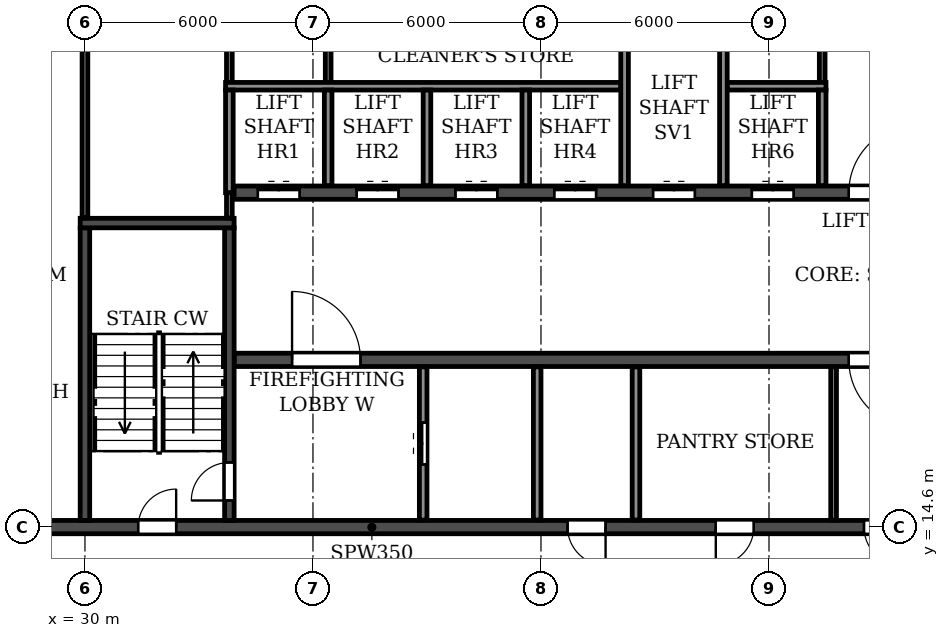
"""IFC4 building model, lengths in metres.
Left out: names, types, materials, properties, quantities, classifications, styles, units other than length and angle.
Written with IfcOpenShell. Run it as: python <this file> out.ifc"""

import sys

from ifc_helpers import new_model, si_unit, direction, frame, frame_2d, origin, place, context, subcontext, project, spatial, rectangle, extrude, element, fill, save


model = new_model("IFC4")
c1 = context("Model", 3, precision=1e-05, world=origin(), true_north=direction((0.0, 1.0)))
c2 = subcontext(c1, "Body", "Model", "MODEL_VIEW")
j1 = project(units=[si_unit("LENGTHUNIT", "METRE"), si_unit("PLANEANGLEUNIT", "RADIAN")], contexts=[c1])
p1 = place(None, origin())
s1 = spatial("IfcSite", under=j1, at=p1, CompositionType="ELEMENT")
p2 = place(p1, origin())
s2 = spatial("IfcBuilding", under=s1, at=p2, CompositionType="ELEMENT")
p3 = place(p2, frame((0.0, 0.0, 231.3)))
s3 = spatial("IfcBuildingStorey", under=s2, at=p3, CompositionType="ELEMENT", Elevation=231.3)
p4 = place(p3, frame((18.2, 14.6, 0.0), z_axis=(0.0, 0.0, 1.0), x_axis=(1.0, 0.0, 0.0)))
e1 = element("IfcWall", 1, at=p4, inside=s3, PredefinedType="SOLIDWALL", context=c2, shape_type="SweptSolid", body=[
    extrude(rectangle(XDim=65.6, YDim=0.35, at=frame_2d((32.8, 0.0))), origin(), (0.0, 0.0, 1.0), 3.08),
])
p5 = place(p4, frame((0.7, 0.0, 0.0)))
e2 = element("IfcOpeningElement", 2, at=p5, cuts=e1, PredefinedType="OPENING", context=c2, shape_type="SweptSolid", body=[
    extrude(rectangle(XDim=1.0, YDim=2.1, at=frame_2d((0.5, 1.05))), frame((0.0, 0.185, 0.0), z_axis=(0.0, -1.0, 0.0), x_axis=(1.0, 0.0, 0.0)), (0.0, 0.0, 1.0), 0.37),
])
p6 = place(p4, frame((8.6, 0.0, 0.0)))
e3 = element("IfcOpeningElement", 3, at=p6, cuts=e1, PredefinedType="OPENING", context=c2, shape_type="SweptSolid", body=[
    extrude(rectangle(XDim=1.0, YDim=2.1, at=frame_2d((0.5, 1.05))), frame((0.0, 0.185, 0.0), z_axis=(0.0, -1.0, 0.0), x_axis=(1.0, 0.0, 0.0)), (0.0, 0.0, 1.0), 0.37),
])
p7 = place(p4, frame((13.2, 0.0, 0.0)))
e4 = element("IfcOpeningElement", 4, at=p7, cuts=e1, PredefinedType="OPENING", context=c2, shape_type="SweptSolid", body=[
    extrude(rectangle(XDim=1.0, YDim=2.1, at=frame_2d((0.5, 1.05))), frame((0.0, 0.185, 0.0), z_axis=(0.0, -1.0, 0.0), x_axis=(1.0, 0.0, 0.0)), (0.0, 0.0, 1.0), 0.37),
])
p8 = place(p4, frame((24.5, 0.0, 0.0)))
e5 = element("IfcOpeningElement", 5, at=p8, cuts=e1, PredefinedType="OPENING", context=c2, shape_type="SweptSolid", body=[
    extrude(rectangle(XDim=1.0, YDim=2.1, at=frame_2d((0.5, 1.05))), frame((0.0, 0.185, 0.0), z_axis=(0.0, -1.0, 0.0), x_axis=(1.0, 0.0, 0.0)), (0.0, 0.0, 1.0), 0.37),
])
p9 = place(p4, frame((28.4, 0.0, 0.0)))
e6 = element("IfcOpeningElement", 6, at=p9, cuts=e1, PredefinedType="OPENING", context=c2, shape_type="SweptSolid", body=[
    extrude(rectangle(XDim=1.0, YDim=2.1, at=frame_2d((0.5, 1.05))), frame((0.0, 0.185, 0.0), z_axis=(0.0, -1.0, 0.0), x_axis=(1.0, 0.0, 0.0)), (0.0, 0.0, 1.0), 0.37),
])
p10 = place(p4, frame((32.3, 0.0, 0.0)))
e7 = element("IfcOpeningElement", 7, at=p10, cuts=e1, PredefinedType="OPENING", context=c2, shape_type="SweptSolid", body=[
    extrude(rectangle(XDim=1.0, YDim=2.1, at=frame_2d((0.5, 1.05))), frame((0.0, 0.185, 0.0), z_axis=(0.0, -1.0, 0.0), x_axis=(1.0, 0.0, 0.0)), (0.0, 0.0, 1.0), 0.37),
])
p11 = place(p4, frame((36.2, 0.0, 0.0)))
e8 = element("IfcOpeningElement", 8, at=p11, cuts=e1, PredefinedType="OPENING", context=c2, shape_type="SweptSolid", body=[
    extrude(rectangle(XDim=1.0, YDim=2.1, at=frame_2d((0.5, 1.05))), frame((0.0, 0.185, 0.0), z_axis=(0.0, -1.0, 0.0), x_axis=(1.0, 0.0, 0.0)), (0.0, 0.0, 1.0), 0.37),
])
p12 = place(p4, frame((40.1, 0.0, 0.0)))
e9 = element("IfcOpeningElement", 9, at=p12, cuts=e1, PredefinedType="OPENING", context=c2, shape_type="SweptSolid", body=[
    extrude(rectangle(XDim=1.0, YDim=2.1, at=frame_2d((0.5, 1.05))), frame((0.0, 0.185, 0.0), z_axis=(0.0, -1.0, 0.0), x_axis=(1.0, 0.0, 0.0)), (0.0, 0.0, 1.0), 0.37),
])
p13 = place(p4, frame((51.4, 0.0, 0.0)))
e10 = element("IfcOpeningElement", 10, at=p13, cuts=e1, PredefinedType="OPENING", context=c2, shape_type="SweptSolid", body=[
    extrude(rectangle(XDim=1.0, YDim=2.1, at=frame_2d((0.5, 1.05))), frame((0.0, 0.185, 0.0), z_axis=(0.0, -1.0, 0.0), x_axis=(1.0, 0.0, 0.0)), (0.0, 0.0, 1.0), 0.37),
])
p14 = place(p4, frame((56.0, 0.0, 0.0)))
e11 = element("IfcOpeningElement", 11, at=p14, cuts=e1, PredefinedType="OPENING", context=c2, shape_type="SweptSolid", body=[
    extrude(rectangle(XDim=1.0, YDim=2.1, at=frame_2d((0.5, 1.05))), frame((0.0, 0.185, 0.0), z_axis=(0.0, -1.0, 0.0), x_axis=(1.0, 0.0, 0.0)), (0.0, 0.0, 1.0), 0.37),
])
p15 = place(p4, frame((63.9, 0.0, 0.0)))
e12 = element("IfcOpeningElement", 12, at=p15, cuts=e1, PredefinedType="OPENING", context=c2, shape_type="SweptSolid", body=[
    extrude(rectangle(XDim=1.0, YDim=2.1, at=frame_2d((0.5, 1.05))), frame((0.0, 0.185, 0.0), z_axis=(0.0, -1.0, 0.0), x_axis=(1.0, 0.0, 0.0)), (0.0, 0.0, 1.0), 0.37),
])
p16 = place(p3, frame((33.925, 19.0, 0.0), z_axis=(0.0, 0.0, 1.0), x_axis=(1.0, 0.0, 0.0)))
e13 = element("IfcWall", 13, at=p16, inside=s3, PredefinedType="SOLIDWALL", context=c2, shape_type="SweptSolid", body=[
    extrude(rectangle(XDim=34.15, YDim=0.35, at=frame_2d((17.075, 0.0))), origin(), (0.0, 0.0, 1.0), 3.08),
])
p17 = place(p16, frame((16.175, 0.0, 0.0)))
e14 = element("IfcOpeningElement", 14, at=p17, cuts=e13, PredefinedType="OPENING", context=c2, shape_type="SweptSolid", body=[
    extrude(rectangle(XDim=1.8, YDim=2.1, at=frame_2d((0.9, 1.05))), frame((0.0, 0.185, 0.0), z_axis=(0.0, -1.0, 0.0), x_axis=(1.0, 0.0, 0.0)), (0.0, 0.0, 1.0), 0.37),
])
p18 = place(p16, frame((1.525, 0.0, 0.0)))
e15 = element("IfcOpeningElement", 15, at=p18, cuts=e13, PredefinedType="OPENING", context=c2, shape_type="SweptSolid", body=[
    extrude(rectangle(XDim=1.8, YDim=2.1, at=frame_2d((0.9, 1.05))), frame((0.0, 0.185, 0.0), z_axis=(0.0, -1.0, 0.0), x_axis=(1.0, 0.0, 0.0)), (0.0, 0.0, 1.0), 0.37),
])
p19 = place(p16, frame((30.825, 0.0, 0.0)))
e16 = element("IfcOpeningElement", 16, at=p19, cuts=e13, PredefinedType="OPENING", context=c2, shape_type="SweptSolid", body=[
    extrude(rectangle(XDim=1.8, YDim=2.1, at=frame_2d((0.9, 1.05))), frame((0.0, 0.185, 0.0), z_axis=(0.0, -1.0, 0.0), x_axis=(1.0, 0.0, 0.0)), (0.0, 0.0, 1.0), 0.37),
])
p20 = place(p3, frame((33.925, 23.4, 0.0), z_axis=(0.0, 0.0, 1.0), x_axis=(1.0, 0.0, 0.0)))
e17 = element("IfcWall", 17, at=p20, inside=s3, PredefinedType="SOLIDWALL", context=c2, shape_type="SweptSolid", body=[
    extrude(rectangle(XDim=34.15, YDim=0.35, at=frame_2d((17.075, 0.0))), origin(), (0.0, 0.0, 1.0), 3.08),
])
p21 = place(p20, frame((16.175, 0.0, 0.0)))
e18 = element("IfcOpeningElement", 18, at=p21, cuts=e17, PredefinedType="OPENING", context=c2, shape_type="SweptSolid", body=[
    extrude(rectangle(XDim=1.8, YDim=2.1, at=frame_2d((0.9, 1.05))), frame((0.0, 0.185, 0.0), z_axis=(0.0, -1.0, 0.0), x_axis=(1.0, 0.0, 0.0)), (0.0, 0.0, 1.0), 0.37),
])
p22 = place(p20, frame((0.625, 0.0, 0.0)))
e19 = element("IfcOpeningElement", 19, at=p22, cuts=e17, PredefinedType="OPENING", context=c2, shape_type="SweptSolid", body=[
    extrude(rectangle(XDim=1.1, YDim=2.1, at=frame_2d((0.55, 1.05))), frame((0.0, 0.185, 0.0), z_axis=(0.0, -1.0, 0.0), x_axis=(1.0, 0.0, 0.0)), (0.0, 0.0, 1.0), 0.37),
])
p23 = place(p20, frame((3.225, 0.0, 0.0)))
e20 = element("IfcOpeningElement", 20, at=p23, cuts=e17, PredefinedType="OPENING", context=c2, shape_type="SweptSolid", body=[
    extrude(rectangle(XDim=1.1, YDim=2.1, at=frame_2d((0.55, 1.05))), frame((0.0, 0.185, 0.0), z_axis=(0.0, -1.0, 0.0), x_axis=(1.0, 0.0, 0.0)), (0.0, 0.0, 1.0), 0.37),
])
p24 = place(p20, frame((5.825, 0.0, 0.0)))
e21 = element("IfcOpeningElement", 21, at=p24, cuts=e17, PredefinedType="OPENING", context=c2, shape_type="SweptSolid", body=[
    extrude(rectangle(XDim=1.1, YDim=2.1, at=frame_2d((0.55, 1.05))), frame((0.0, 0.185, 0.0), z_axis=(0.0, -1.0, 0.0), x_axis=(1.0, 0.0, 0.0)), (0.0, 0.0, 1.0), 0.37),
])
p25 = place(p20, frame((8.425, 0.0, 0.0)))
e22 = element("IfcOpeningElement", 22, at=p25, cuts=e17, PredefinedType="OPENING", context=c2, shape_type="SweptSolid", body=[
    extrude(rectangle(XDim=1.1, YDim=2.1, at=frame_2d((0.55, 1.05))), frame((0.0, 0.185, 0.0), z_axis=(0.0, -1.0, 0.0), x_axis=(1.0, 0.0, 0.0)), (0.0, 0.0, 1.0), 0.37),
])
p26 = place(p20, frame((11.025, 0.0, 0.0)))
e23 = element("IfcOpeningElement", 23, at=p26, cuts=e17, PredefinedType="OPENING", context=c2, shape_type="SweptSolid", body=[
    extrude(rectangle(XDim=1.1, YDim=2.1, at=frame_2d((0.55, 1.05))), frame((0.0, 0.185, 0.0), z_axis=(0.0, -1.0, 0.0), x_axis=(1.0, 0.0, 0.0)), (0.0, 0.0, 1.0), 0.37),
])
p27 = place(p20, frame((13.625, 0.0, 0.0)))
e24 = element("IfcOpeningElement", 24, at=p27, cuts=e17, PredefinedType="OPENING", context=c2, shape_type="SweptSolid", body=[
    extrude(rectangle(XDim=1.1, YDim=2.1, at=frame_2d((0.55, 1.05))), frame((0.0, 0.185, 0.0), z_axis=(0.0, -1.0, 0.0), x_axis=(1.0, 0.0, 0.0)), (0.0, 0.0, 1.0), 0.37),
])
p28 = place(p20, frame((27.225, 0.0, 0.0)))
e25 = element("IfcOpeningElement", 25, at=p28, cuts=e17, PredefinedType="OPENING", context=c2, shape_type="SweptSolid", body=[
    extrude(rectangle(XDim=1.1, YDim=2.1, at=frame_2d((0.55, 1.05))), frame((0.0, 0.185, 0.0), z_axis=(0.0, -1.0, 0.0), x_axis=(1.0, 0.0, 0.0)), (0.0, 0.0, 1.0), 0.37),
])
p29 = place(p3, frame((30.0, 14.775, 0.0), z_axis=(0.0, 0.0, 1.0), x_axis=(0.0, 1.0, 0.0)))
e26 = element("IfcWall", 26, at=p29, inside=s3, PredefinedType="SOLIDWALL", context=c2, shape_type="SweptSolid", body=[
    extrude(rectangle(XDim=7.7, YDim=0.25, at=frame_2d((3.85, 0.0))), origin(), (0.0, 0.0, 1.0), 3.08),
])
p30 = place(p3, frame((33.8, 14.775, 0.0), z_axis=(0.0, 0.0, 1.0), x_axis=(0.0, 1.0, 0.0)))
e27 = element("IfcWall", 27, at=p30, inside=s3, PredefinedType="SOLIDWALL", context=c2, shape_type="SweptSolid", body=[
    extrude(rectangle(XDim=7.7, YDim=0.25, at=frame_2d((3.85, 0.0))), origin(), (0.0, 0.0, 1.0), 3.08),
])
p31 = place(p30, frame((0.525, 0.0, 0.0)))
e28 = element("IfcOpeningElement", 28, at=p31, cuts=e27, PredefinedType="OPENING", context=c2, shape_type="SweptSolid", body=[
    extrude(rectangle(XDim=1.0, YDim=2.1, at=frame_2d((0.5, 1.05))), frame((0.0, 0.135, 0.0), z_axis=(0.0, -1.0, 0.0), x_axis=(1.0, 0.0, 0.0)), (0.0, 0.0, 1.0), 0.27),
])
p32 = place(p3, frame((29.875, 22.6, 0.0), z_axis=(0.0, 0.0, 1.0), x_axis=(1.0, 0.0, 0.0)))
e29 = element("IfcWall", 29, at=p32, inside=s3, PredefinedType="SOLIDWALL", context=c2, shape_type="SweptSolid", body=[
    extrude(rectangle(XDim=4.05, YDim=0.25, at=frame_2d((2.025, 0.0))), origin(), (0.0, 0.0, 1.0), 3.08),
])
p33 = place(p3, frame((49.4, 26.3, 0.0), z_axis=(0.0, 0.0, 1.0), x_axis=(0.0, 1.0, 0.0)))
e30 = element("IfcWall", 30, at=p33, inside=s3, PredefinedType="PARTITIONING", context=c2, shape_type="SweptSolid", body=[
    extrude(rectangle(XDim=1.315, YDim=0.15, at=frame_2d((0.657, 0.0))), origin(), (0.0, 0.0, 1.0), 3.08),
])
p34 = place(p3, frame((49.7, 14.785, 0.0), z_axis=(0.0, 0.0, 1.0), x_axis=(0.0, 1.0, 0.0)))
e31 = element("IfcWall", 31, at=p34, inside=s3, PredefinedType="PARTITIONING", context=c2, shape_type="SweptSolid", body=[
    extrude(rectangle(XDim=4.03, YDim=0.15, at=frame_2d((2.015, 0.0))), origin(), (0.0, 0.0, 1.0), 3.08),
])
p35 = place(p3, frame((36.4, 26.3, 0.0), z_axis=(0.0, 0.0, 1.0), x_axis=(0.0, 1.0, 0.0)))
e32 = element("IfcWall", 32, at=p35, inside=s3, PredefinedType="PARTITIONING", context=c2, shape_type="SweptSolid", body=[
    extrude(rectangle(XDim=1.315, YDim=0.15, at=frame_2d((0.657, 0.0))), origin(), (0.0, 0.0, 1.0), 3.08),
])
p36 = place(p3, frame((44.5, 14.785, 0.0), z_axis=(0.0, 0.0, 1.0), x_axis=(0.0, 1.0, 0.0)))
e33 = element("IfcWall", 33, at=p36, inside=s3, PredefinedType="PARTITIONING", context=c2, shape_type="SweptSolid", body=[
    extrude(rectangle(XDim=4.03, YDim=0.2, at=frame_2d((2.015, 0.0))), origin(), (0.0, 0.0, 1.0), 3.08),
])
p37 = place(p3, frame((30.0, 22.735, 0.0), z_axis=(0.0, 0.0, 1.0), x_axis=(0.0, 1.0, 0.0)))
e34 = element("IfcWall", 34, at=p37, inside=s3, PredefinedType="PARTITIONING", context=c2, shape_type="SweptSolid", body=[
    extrude(rectangle(XDim=4.88, YDim=0.15, at=frame_2d((2.44, 0.0))), origin(), (0.0, 0.0, 1.0), 3.08),
])
p38 = place(p3, frame((33.8, 22.735, 0.0), z_axis=(0.0, 0.0, 1.0), x_axis=(0.0, 1.0, 0.0)))
e35 = element("IfcWall", 35, at=p38, inside=s3, PredefinedType="PARTITIONING", context=c2, shape_type="SweptSolid", body=[
    extrude(rectangle(XDim=0.665, YDim=0.15, at=frame_2d((0.333, 0.0))), origin(), (0.0, 0.0, 1.0), 3.08),
])
p39 = place(p3, frame((33.8, 26.3, 0.0), z_axis=(0.0, 0.0, 1.0), x_axis=(0.0, 1.0, 0.0)))
e36 = element("IfcWall", 36, at=p39, inside=s3, PredefinedType="PARTITIONING", context=c2, shape_type="SweptSolid", body=[
    extrude(rectangle(XDim=1.315, YDim=0.15, at=frame_2d((0.657, 0.0))), origin(), (0.0, 0.0, 1.0), 3.08),
])
p40 = place(p3, frame((33.7, 26.2, 0.0), z_axis=(0.0, 0.0, 1.0), x_axis=(1.0, 0.0, 0.0)))
e37 = element("IfcWall", 37, at=p40, inside=s3, PredefinedType="PARTITIONING", context=c2, shape_type="SweptSolid", body=[
    extrude(rectangle(XDim=10.4, YDim=0.2, at=frame_2d((5.2, 0.0))), origin(), (0.0, 0.0, 1.0), 3.08),
])
p41 = place(p3, frame((46.9, 26.2, 0.0), z_axis=(0.0, 0.0, 1.0), x_axis=(1.0, 0.0, 0.0)))
e38 = element("IfcWall", 38, at=p41, inside=s3, PredefinedType="PARTITIONING", context=c2, shape_type="SweptSolid", body=[
    extrude(rectangle(XDim=2.6, YDim=0.2, at=frame_2d((1.3, 0.0))), origin(), (0.0, 0.0, 1.0), 3.08),
])
p42 = place(p3, frame((33.8, 23.4, 0.0), z_axis=(0.0, 0.0, 1.0), x_axis=(0.0, 1.0, 0.0)))
e39 = element("IfcWall", 39, at=p42, inside=s3, PredefinedType="PARTITIONING", context=c2, shape_type="SweptSolid", body=[
    extrude(rectangle(XDim=2.7, YDim=0.2, at=frame_2d((1.35, 0.0))), origin(), (0.0, 0.0, 1.0), 3.08),
])
p43 = place(p3, frame((36.4, 23.585, 0.0), z_axis=(0.0, 0.0, 1.0), x_axis=(0.0, 1.0, 0.0)))
e40 = element("IfcWall", 40, at=p43, inside=s3, PredefinedType="PARTITIONING", context=c2, shape_type="SweptSolid", body=[
    extrude(rectangle(XDim=2.515, YDim=0.2, at=frame_2d((1.258, 0.0))), origin(), (0.0, 0.0, 1.0), 3.08),
])
p44 = place(p3, frame((38.9, 14.785, 0.0), z_axis=(0.0, 0.0, 1.0), x_axis=(0.0, 1.0, 0.0)))
e41 = element("IfcWall", 41, at=p44, inside=s3, PredefinedType="PARTITIONING", context=c2, shape_type="SweptSolid", body=[
    extrude(rectangle(XDim=4.03, YDim=0.2, at=frame_2d((2.015, 0.0))), origin(), (0.0, 0.0, 1.0), 3.08),
])
p45 = place(p44, frame((1.465, 0.0, 0.0)))
e42 = element("IfcOpeningElement", 42, at=p45, cuts=e41, PredefinedType="OPENING", context=c2, shape_type="SweptSolid", body=[
    extrude(rectangle(XDim=1.1, YDim=2.1, at=frame_2d((0.55, 1.05))), frame((0.0, 0.11, 0.0), z_axis=(0.0, -1.0, 0.0), x_axis=(1.0, 0.0, 0.0)), (0.0, 0.0, 1.0), 0.22),
])
for number, where, z_axis, x_axis in (
    (43, (39.0, 23.585, 0.0), (0.0, 0.0, 1.0), (0.0, 1.0, 0.0)),
    (44, (41.6, 23.585, 0.0), (0.0, 0.0, 1.0), (0.0, 1.0, 0.0)),
):
    element("IfcWall", number, at=place(p3, frame(where, z_axis=z_axis, x_axis=x_axis)), inside=s3, PredefinedType="PARTITIONING", context=c2, shape_type="SweptSolid", body=[
        extrude(rectangle(XDim=2.515, YDim=0.2, at=frame_2d((1.258, 0.0))), origin(), (0.0, 0.0, 1.0), 3.08),
    ])
for number, where, z_axis, x_axis in (
    (45, (41.9, 14.785, 0.0), (0.0, 0.0, 1.0), (0.0, 1.0, 0.0)),
    (46, (44.2, 23.585, 0.0), (0.0, 0.0, 1.0), (0.0, 1.0, 0.0)),
    (47, (46.8, 23.585, 0.0), (0.0, 0.0, 1.0), (0.0, 1.0, 0.0)),
):
    element("IfcWall", number, at=place(p3, frame(where, z_axis=z_axis, x_axis=x_axis)), inside=s3, PredefinedType="PARTITIONING", context=c2, shape_type="SweptSolid", body=[
        extrude(rectangle(XDim=4.03, YDim=0.2, at=frame_2d((2.015, 0.0))), origin(), (0.0, 0.0, 1.0), 3.08),
    ])
p46 = place(p3, frame((49.4, 23.585, 0.0), z_axis=(0.0, 0.0, 1.0), x_axis=(0.0, 1.0, 0.0)))
e48 = element("IfcWall", 48, at=p46, inside=s3, PredefinedType="PARTITIONING", context=c2, shape_type="SweptSolid", body=[
    extrude(rectangle(XDim=2.515, YDim=0.2, at=frame_2d((1.258, 0.0))), origin(), (0.0, 0.0, 1.0), 3.08),
])
p47 = place(p7, origin())
e49 = element("IfcDoor", 49, at=p47, inside=s3, OperationType="SINGLE_SWING_RIGHT", PredefinedType="DOOR", context=c2, shape_type="SweptSolid", body=[
    extrude(rectangle(XDim=1.0, YDim=2.1, at=frame_2d((0.5, 1.05))), frame((0.0, 0.025, 0.0), z_axis=(0.0, -1.0, 0.0), x_axis=(1.0, 0.0, 0.0)), (0.0, 0.0, 1.0), 0.05),
])
fill(e4, e49)
p48 = place(p8, frame((1.0, 0.0, 0.0), z_axis=(0.0, 0.0, 1.0), x_axis=(-1.0, 0.0, 0.0)))
e50 = element("IfcDoor", 50, at=p48, inside=s3, OperationType="SINGLE_SWING_LEFT", PredefinedType="DOOR", context=c2, shape_type="SweptSolid", body=[
    extrude(rectangle(XDim=1.0, YDim=2.1, at=frame_2d((0.5, 1.05))), frame((0.0, 0.025, 0.0), z_axis=(0.0, -1.0, 0.0), x_axis=(1.0, 0.0, 0.0)), (0.0, 0.0, 1.0), 0.05),
])
fill(e5, e50)
p49 = place(p9, frame((1.0, 0.0, 0.0), z_axis=(0.0, 0.0, 1.0), x_axis=(-1.0, 0.0, 0.0)))
e51 = element("IfcDoor", 51, at=p49, inside=s3, OperationType="SINGLE_SWING_RIGHT", PredefinedType="DOOR", context=c2, shape_type="SweptSolid", body=[
    extrude(rectangle(XDim=1.0, YDim=2.1, at=frame_2d((0.5, 1.05))), frame((0.0, 0.025, 0.0), z_axis=(0.0, -1.0, 0.0), x_axis=(1.0, 0.0, 0.0)), (0.0, 0.0, 1.0), 0.05),
])
fill(e6, e51)
p50 = place(p10, frame((1.0, 0.0, 0.0), z_axis=(0.0, 0.0, 1.0), x_axis=(-1.0, 0.0, 0.0)))
e52 = element("IfcDoor", 52, at=p50, inside=s3, OperationType="SINGLE_SWING_LEFT", PredefinedType="DOOR", context=c2, shape_type="SweptSolid", body=[
    extrude(rectangle(XDim=1.0, YDim=2.1, at=frame_2d((0.5, 1.05))), frame((0.0, 0.025, 0.0), z_axis=(0.0, -1.0, 0.0), x_axis=(1.0, 0.0, 0.0)), (0.0, 0.0, 1.0), 0.05),
])
fill(e7, e52)
p51 = place(p31, origin())
e53 = element("IfcDoor", 53, at=p51, inside=s3, OperationType="SINGLE_SWING_LEFT", PredefinedType="DOOR", context=c2, shape_type="SweptSolid", body=[
    extrude(rectangle(XDim=1.0, YDim=2.1, at=frame_2d((0.5, 1.05))), frame((0.0, 0.025, 0.0), z_axis=(0.0, -1.0, 0.0), x_axis=(1.0, 0.0, 0.0)), (0.0, 0.0, 1.0), 0.05),
])
fill(e28, e53)
p52 = place(p45, origin())
e54 = element("IfcDoor", 54, at=p52, inside=s3, OperationType="DOUBLE_DOOR_SLIDING", PredefinedType="DOOR", context=c2, shape_type="SweptSolid", body=[
    extrude(rectangle(XDim=1.1, YDim=2.1, at=frame_2d((0.55, 1.05))), frame((0.0, 0.025, 0.0), z_axis=(0.0, -1.0, 0.0), x_axis=(1.0, 0.0, 0.0)), (0.0, 0.0, 1.0), 0.05),
])
fill(e42, e54)
p53 = place(p21, origin())
e55 = element("IfcDoor", 55, at=p53, inside=s3, OperationType="DOUBLE_DOOR_SINGLE_SWING", PredefinedType="DOOR", context=c2, shape_type="SweptSolid", body=[
    extrude(rectangle(XDim=1.8, YDim=2.1, at=frame_2d((0.9, 1.05))), frame((0.0, 0.025, 0.0), z_axis=(0.0, -1.0, 0.0), x_axis=(1.0, 0.0, 0.0)), (0.0, 0.0, 1.0), 0.05),
])
fill(e18, e55)
p54 = place(p17, frame((1.8, 0.0, 0.0), z_axis=(0.0, 0.0, 1.0), x_axis=(-1.0, 0.0, 0.0)))
e56 = element("IfcDoor", 56, at=p54, inside=s3, OperationType="DOUBLE_DOOR_SINGLE_SWING", PredefinedType="DOOR", context=c2, shape_type="SweptSolid", body=[
    extrude(rectangle(XDim=1.8, YDim=2.1, at=frame_2d((0.9, 1.05))), frame((0.0, 0.025, 0.0), z_axis=(0.0, -1.0, 0.0), x_axis=(1.0, 0.0, 0.0)), (0.0, 0.0, 1.0), 0.05),
])
fill(e14, e56)
p55 = place(p22, origin())
e57 = element("IfcDoor", 57, at=p55, inside=s3, OperationType="DOUBLE_DOOR_SLIDING", PredefinedType="DOOR", context=c2, shape_type="SweptSolid", body=[
    extrude(rectangle(XDim=1.1, YDim=2.1, at=frame_2d((0.55, 1.05))), frame((0.0, 0.025, 0.0), z_axis=(0.0, -1.0, 0.0), x_axis=(1.0, 0.0, 0.0)), (0.0, 0.0, 1.0), 0.05),
])
fill(e19, e57)
p56 = place(p18, origin())
e58 = element("IfcDoor", 58, at=p56, inside=s3, OperationType="DOUBLE_DOOR_SINGLE_SWING", PredefinedType="DOOR", context=c2, shape_type="SweptSolid", body=[
    extrude(rectangle(XDim=1.8, YDim=2.1, at=frame_2d((0.9, 1.05))), frame((0.0, 0.025, 0.0), z_axis=(0.0, -1.0, 0.0), x_axis=(1.0, 0.0, 0.0)), (0.0, 0.0, 1.0), 0.05),
])
fill(e15, e58)
p57 = place(p23, origin())
e59 = element("IfcDoor", 59, at=p57, inside=s3, OperationType="DOUBLE_DOOR_SLIDING", PredefinedType="DOOR", context=c2, shape_type="SweptSolid", body=[
    extrude(rectangle(XDim=1.1, YDim=2.1, at=frame_2d((0.55, 1.05))), frame((0.0, 0.025, 0.0), z_axis=(0.0, -1.0, 0.0), x_axis=(1.0, 0.0, 0.0)), (0.0, 0.0, 1.0), 0.05),
])
fill(e20, e59)
p58 = place(p24, origin())
e60 = element("IfcDoor", 60, at=p58, inside=s3, OperationType="DOUBLE_DOOR_SLIDING", PredefinedType="DOOR", context=c2, shape_type="SweptSolid", body=[
    extrude(rectangle(XDim=1.1, YDim=2.1, at=frame_2d((0.55, 1.05))), frame((0.0, 0.025, 0.0), z_axis=(0.0, -1.0, 0.0), x_axis=(1.0, 0.0, 0.0)), (0.0, 0.0, 1.0), 0.05),
])
fill(e21, e60)
p59 = place(p25, origin())
e61 = element("IfcDoor", 61, at=p59, inside=s3, OperationType="DOUBLE_DOOR_SLIDING", PredefinedType="DOOR", context=c2, shape_type="SweptSolid", body=[
    extrude(rectangle(XDim=1.1, YDim=2.1, at=frame_2d((0.55, 1.05))), frame((0.0, 0.025, 0.0), z_axis=(0.0, -1.0, 0.0), x_axis=(1.0, 0.0, 0.0)), (0.0, 0.0, 1.0), 0.05),
])
fill(e22, e61)
p60 = place(p26, origin())
e62 = element("IfcDoor", 62, at=p60, inside=s3, OperationType="DOUBLE_DOOR_SLIDING", PredefinedType="DOOR", context=c2, shape_type="SweptSolid", body=[
    extrude(rectangle(XDim=1.1, YDim=2.1, at=frame_2d((0.55, 1.05))), frame((0.0, 0.025, 0.0), z_axis=(0.0, -1.0, 0.0), x_axis=(1.0, 0.0, 0.0)), (0.0, 0.0, 1.0), 0.05),
])
fill(e23, e62)
p61 = place(p27, origin())
e63 = element("IfcDoor", 63, at=p61, inside=s3, OperationType="DOUBLE_DOOR_SLIDING", PredefinedType="DOOR", context=c2, shape_type="SweptSolid", body=[
    extrude(rectangle(XDim=1.1, YDim=2.1, at=frame_2d((0.55, 1.05))), frame((0.0, 0.025, 0.0), z_axis=(0.0, -1.0, 0.0), x_axis=(1.0, 0.0, 0.0)), (0.0, 0.0, 1.0), 0.05),
])
fill(e24, e63)
save(model, sys.argv[1])
